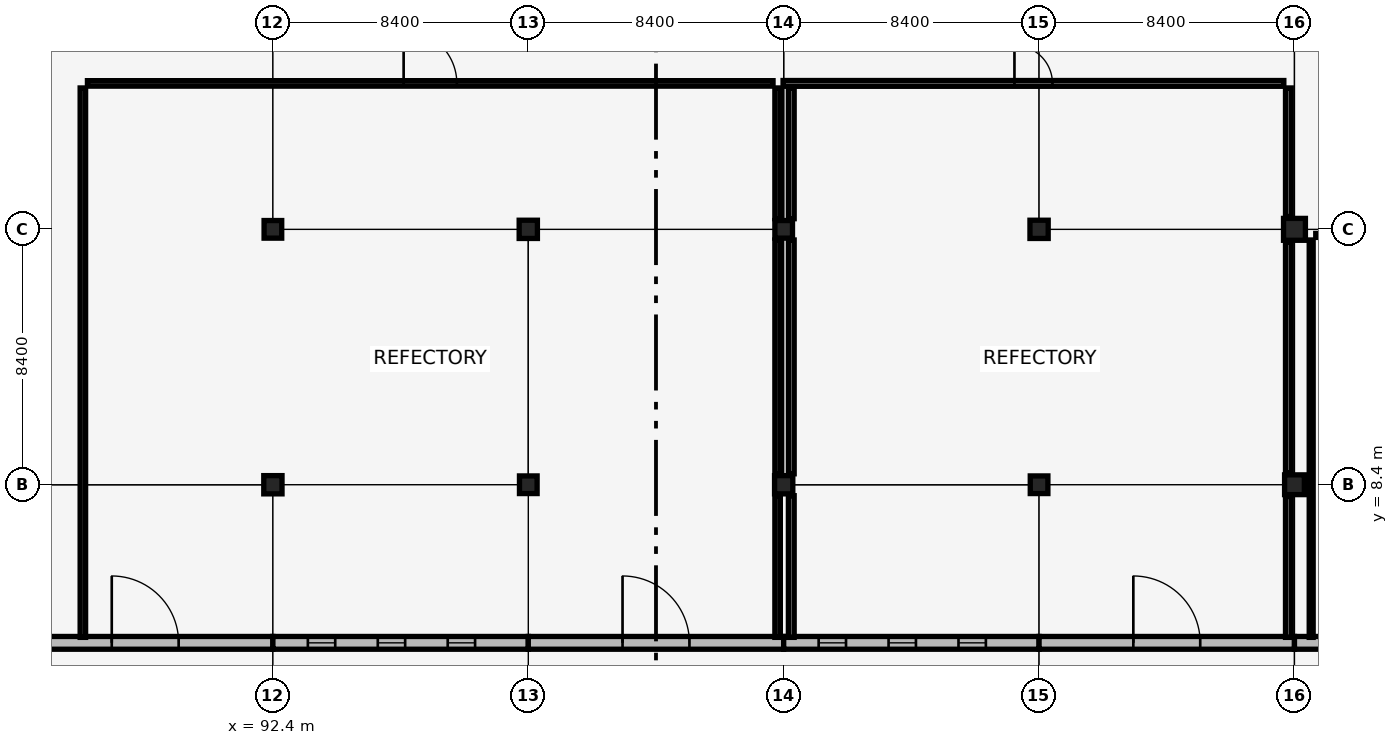
"""IFC4 building model, lengths in metres.
Left out: names, types, materials, properties, quantities, classifications, styles, units other than length and angle.
Written with IfcOpenShell. Run it as: python <this file> out.ifc"""

import sys

from ifc_helpers import new_model, si_unit, direction, frame, frame_2d, origin, origin_2d, place, context, subcontext, project, spatial, rectangle, extrude, element, fill, save


model = new_model("IFC4")
c1 = context("Model", 3, precision=1e-05, world=origin(), true_north=direction((0.0, 1.0)))
c2 = subcontext(c1, "Body", "Model", "MODEL_VIEW")
j1 = project(units=[si_unit("LENGTHUNIT", "METRE"), si_unit("PLANEANGLEUNIT", "RADIAN")], contexts=[c1])
p1 = place(None, origin())
s1 = spatial("IfcSite", under=j1, at=p1, CompositionType="ELEMENT")
p2 = place(p1, origin())
s2 = spatial("IfcBuilding", under=s1, at=p2, CompositionType="ELEMENT")
p3 = place(p2, origin())
s3 = spatial("IfcBuildingStorey", under=s2, at=p3, CompositionType="ELEMENT", Elevation=0.0)
p4 = place(p3, frame((92.4, 8.4, 0.0), z_axis=(0.0, 0.0, 1.0), x_axis=(1.0, 0.0, 0.0)))
e1 = element("IfcColumn", 1, at=p4, inside=s3, PredefinedType="COLUMN", context=c2, shape_type="SweptSolid", body=[
    extrude(rectangle(XDim=0.6, YDim=0.6, at=origin_2d()), origin(), (0.0, 0.0, 1.0), 5.14),
])
for number, where, z_axis, x_axis in (
    (2, (92.4, 16.8, 0.0), (0.0, 0.0, 1.0), (1.0, 0.0, 0.0)),
    (3, (100.8, 8.4, 0.0), (0.0, 0.0, 1.0), (1.0, 0.0, 0.0)),
):
    element("IfcColumn", number, at=place(p3, frame(where, z_axis=z_axis, x_axis=x_axis)), inside=s3, PredefinedType="COLUMN", context=c2, shape_type="SweptSolid", body=[
        extrude(rectangle(XDim=0.58, YDim=0.58, at=origin_2d()), origin(), (0.0, 0.0, 1.0), 5.14),
    ])
for number, where, z_axis, x_axis in (
    (4, (100.8, 16.8, 0.0), (0.0, 0.0, 1.0), (1.0, 0.0, 0.0)),
    (5, (109.2, 8.4, 0.0), (0.0, 0.0, 1.0), (1.0, 0.0, 0.0)),
):
    element("IfcColumn", number, at=place(p3, frame(where, z_axis=z_axis, x_axis=x_axis)), inside=s3, PredefinedType="COLUMN", context=c2, shape_type="SweptSolid", body=[
        extrude(rectangle(XDim=0.6, YDim=0.6, at=origin_2d()), origin(), (0.0, 0.0, 1.0), 5.14),
    ])
for number, where, z_axis, x_axis in (
    (6, (109.2, 16.8, 0.0), (0.0, 0.0, 1.0), (1.0, 0.0, 0.0)),
    (7, (117.6, 8.4, 0.0), (0.0, 0.0, 1.0), (1.0, 0.0, 0.0)),
):
    element("IfcColumn", number, at=place(p3, frame(where, z_axis=z_axis, x_axis=x_axis)), inside=s3, PredefinedType="COLUMN", context=c2, shape_type="SweptSolid", body=[
        extrude(rectangle(XDim=0.58, YDim=0.58, at=origin_2d()), origin(), (0.0, 0.0, 1.0), 5.14),
    ])
p5 = place(p3, frame((117.6, 16.8, 0.0), z_axis=(0.0, 0.0, 1.0), x_axis=(1.0, 0.0, 0.0)))
e8 = element("IfcColumn", 8, at=p5, inside=s3, PredefinedType="COLUMN", context=c2, shape_type="SweptSolid", body=[
    extrude(rectangle(XDim=0.6, YDim=0.6, at=origin_2d()), origin(), (0.0, 0.0, 1.0), 5.14),
])
p6 = place(p3, frame((126.0, 8.4, 0.0), z_axis=(0.0, 0.0, 1.0), x_axis=(1.0, 0.0, 0.0)))
e9 = element("IfcColumn", 9, at=p6, inside=s3, PredefinedType="COLUMN", context=c2, shape_type="SweptSolid", body=[
    extrude(rectangle(XDim=0.65, YDim=0.65, at=origin_2d()), origin(), (0.0, 0.0, 1.0), 5.14),
])
p7 = place(p3, frame((126.0, 16.8, 0.0), z_axis=(0.0, 0.0, 1.0), x_axis=(1.0, 0.0, 0.0)))
e10 = element("IfcColumn", 10, at=p7, inside=s3, PredefinedType="COLUMN", context=c2, shape_type="SweptSolid", body=[
    extrude(rectangle(XDim=0.72, YDim=0.72, at=origin_2d()), origin(), (0.0, 0.0, 1.0), 5.14),
])
p8 = place(p3, frame((84.0, 3.2, 0.0), z_axis=(0.0, 0.0, 1.0), x_axis=(1.0, 0.0, 0.0)))
e11 = element("IfcWall", 11, at=p8, inside=s3, PredefinedType="SOLIDWALL", context=c2, shape_type="SweptSolid", body=[
    extrude(rectangle(XDim=8.4, YDim=0.42, at=frame_2d((4.2, 0.0))), origin(), (0.0, 0.0, 1.0), 4.49),
])
p9 = place(p8, frame((3.1, 0.0, 0.0)))
e12 = element("IfcOpeningElement", 12, at=p9, cuts=e11, PredefinedType="OPENING", context=c2, shape_type="SweptSolid", body=[
    extrude(rectangle(XDim=2.2, YDim=2.4, at=frame_2d((1.1, 1.2))), frame((0.0, 0.22, 0.0), z_axis=(0.0, -1.0, 0.0), x_axis=(1.0, 0.0, 0.0)), (0.0, 0.0, 1.0), 0.44),
])
p10 = place(p3, frame((92.4, 3.2, 0.0), z_axis=(0.0, 0.0, 1.0), x_axis=(1.0, 0.0, 0.0)))
e13 = element("IfcWall", 13, at=p10, inside=s3, PredefinedType="SOLIDWALL", context=c2, shape_type="SweptSolid", body=[
    extrude(rectangle(XDim=8.4, YDim=0.42, at=frame_2d((4.2, 0.0))), origin(), (0.0, 0.0, 1.0), 4.49),
])
p11 = place(p10, frame((1.15, 0.0, 0.85)))
e14 = element("IfcOpeningElement", 14, at=p11, cuts=e13, PredefinedType="OPENING", context=c2, shape_type="SweptSolid", body=[
    extrude(rectangle(XDim=0.9, YDim=3.0, at=frame_2d((0.45, 1.5))), frame((0.0, 0.22, 0.0), z_axis=(0.0, -1.0, 0.0), x_axis=(1.0, 0.0, 0.0)), (0.0, 0.0, 1.0), 0.44),
])
p12 = place(p10, frame((3.45, 0.0, 0.85)))
e15 = element("IfcOpeningElement", 15, at=p12, cuts=e13, PredefinedType="OPENING", context=c2, shape_type="SweptSolid", body=[
    extrude(rectangle(XDim=0.9, YDim=3.0, at=frame_2d((0.45, 1.5))), frame((0.0, 0.22, 0.0), z_axis=(0.0, -1.0, 0.0), x_axis=(1.0, 0.0, 0.0)), (0.0, 0.0, 1.0), 0.44),
])
p13 = place(p10, frame((5.75, 0.0, 0.85)))
e16 = element("IfcOpeningElement", 16, at=p13, cuts=e13, PredefinedType="OPENING", context=c2, shape_type="SweptSolid", body=[
    extrude(rectangle(XDim=0.9, YDim=3.0, at=frame_2d((0.45, 1.5))), frame((0.0, 0.22, 0.0), z_axis=(0.0, -1.0, 0.0), x_axis=(1.0, 0.0, 0.0)), (0.0, 0.0, 1.0), 0.44),
])
p14 = place(p3, frame((100.8, 3.2, 0.0), z_axis=(0.0, 0.0, 1.0), x_axis=(1.0, 0.0, 0.0)))
e17 = element("IfcWall", 17, at=p14, inside=s3, PredefinedType="SOLIDWALL", context=c2, shape_type="SweptSolid", body=[
    extrude(rectangle(XDim=8.4, YDim=0.42, at=frame_2d((4.2, 0.0))), origin(), (0.0, 0.0, 1.0), 4.49),
])
p15 = place(p14, frame((3.1, 0.0, 0.0)))
e18 = element("IfcOpeningElement", 18, at=p15, cuts=e17, PredefinedType="OPENING", context=c2, shape_type="SweptSolid", body=[
    extrude(rectangle(XDim=2.2, YDim=2.4, at=frame_2d((1.1, 1.2))), frame((0.0, 0.22, 0.0), z_axis=(0.0, -1.0, 0.0), x_axis=(1.0, 0.0, 0.0)), (0.0, 0.0, 1.0), 0.44),
])
p16 = place(p3, frame((109.2, 3.2, 0.0), z_axis=(0.0, 0.0, 1.0), x_axis=(1.0, 0.0, 0.0)))
e19 = element("IfcWall", 19, at=p16, inside=s3, PredefinedType="SOLIDWALL", context=c2, shape_type="SweptSolid", body=[
    extrude(rectangle(XDim=8.4, YDim=0.42, at=frame_2d((4.2, 0.0))), origin(), (0.0, 0.0, 1.0), 4.49),
])
p17 = place(p16, frame((1.15, 0.0, 0.85)))
e20 = element("IfcOpeningElement", 20, at=p17, cuts=e19, PredefinedType="OPENING", context=c2, shape_type="SweptSolid", body=[
    extrude(rectangle(XDim=0.9, YDim=3.0, at=frame_2d((0.45, 1.5))), frame((0.0, 0.22, 0.0), z_axis=(0.0, -1.0, 0.0), x_axis=(1.0, 0.0, 0.0)), (0.0, 0.0, 1.0), 0.44),
])
p18 = place(p16, frame((3.45, 0.0, 0.85)))
e21 = element("IfcOpeningElement", 21, at=p18, cuts=e19, PredefinedType="OPENING", context=c2, shape_type="SweptSolid", body=[
    extrude(rectangle(XDim=0.9, YDim=3.0, at=frame_2d((0.45, 1.5))), frame((0.0, 0.22, 0.0), z_axis=(0.0, -1.0, 0.0), x_axis=(1.0, 0.0, 0.0)), (0.0, 0.0, 1.0), 0.44),
])
p19 = place(p16, frame((5.75, 0.0, 0.85)))
e22 = element("IfcOpeningElement", 22, at=p19, cuts=e19, PredefinedType="OPENING", context=c2, shape_type="SweptSolid", body=[
    extrude(rectangle(XDim=0.9, YDim=3.0, at=frame_2d((0.45, 1.5))), frame((0.0, 0.22, 0.0), z_axis=(0.0, -1.0, 0.0), x_axis=(1.0, 0.0, 0.0)), (0.0, 0.0, 1.0), 0.44),
])
p20 = place(p3, frame((117.6, 3.2, 0.0), z_axis=(0.0, 0.0, 1.0), x_axis=(1.0, 0.0, 0.0)))
e23 = element("IfcWall", 23, at=p20, inside=s3, PredefinedType="SOLIDWALL", context=c2, shape_type="SweptSolid", body=[
    extrude(rectangle(XDim=8.4, YDim=0.42, at=frame_2d((4.2, 0.0))), origin(), (0.0, 0.0, 1.0), 4.49),
])
p21 = place(p20, frame((3.1, 0.0, 0.0)))
e24 = element("IfcOpeningElement", 24, at=p21, cuts=e23, PredefinedType="OPENING", context=c2, shape_type="SweptSolid", body=[
    extrude(rectangle(XDim=2.2, YDim=2.4, at=frame_2d((1.1, 1.2))), frame((0.0, 0.22, 0.0), z_axis=(0.0, -1.0, 0.0), x_axis=(1.0, 0.0, 0.0)), (0.0, 0.0, 1.0), 0.44),
])
p22 = place(p3, frame((126.0, 3.2, 0.0), z_axis=(0.0, 0.0, 1.0), x_axis=(1.0, 0.0, 0.0)))
e25 = element("IfcWall", 25, at=p22, inside=s3, PredefinedType="SOLIDWALL", context=c2, shape_type="SweptSolid", body=[
    extrude(rectangle(XDim=8.4, YDim=0.42, at=frame_2d((4.2, 0.0))), origin(), (0.0, 0.0, 1.0), 4.49),
])
p23 = place(p22, frame((1.15, 0.0, 0.85)))
e26 = element("IfcOpeningElement", 26, at=p23, cuts=e25, PredefinedType="OPENING", context=c2, shape_type="SweptSolid", body=[
    extrude(rectangle(XDim=0.9, YDim=3.0, at=frame_2d((0.45, 1.5))), frame((0.0, 0.22, 0.0), z_axis=(0.0, -1.0, 0.0), x_axis=(1.0, 0.0, 0.0)), (0.0, 0.0, 1.0), 0.44),
])
p24 = place(p22, frame((3.45, 0.0, 0.85)))
e27 = element("IfcOpeningElement", 27, at=p24, cuts=e25, PredefinedType="OPENING", context=c2, shape_type="SweptSolid", body=[
    extrude(rectangle(XDim=0.9, YDim=3.0, at=frame_2d((0.45, 1.5))), frame((0.0, 0.22, 0.0), z_axis=(0.0, -1.0, 0.0), x_axis=(1.0, 0.0, 0.0)), (0.0, 0.0, 1.0), 0.44),
])
p25 = place(p22, frame((5.75, 0.0, 0.85)))
e28 = element("IfcOpeningElement", 28, at=p25, cuts=e25, PredefinedType="OPENING", context=c2, shape_type="SweptSolid", body=[
    extrude(rectangle(XDim=0.9, YDim=3.0, at=frame_2d((0.45, 1.5))), frame((0.0, 0.22, 0.0), z_axis=(0.0, -1.0, 0.0), x_axis=(1.0, 0.0, 0.0)), (0.0, 0.0, 1.0), 0.44),
])
p26 = place(p3, frame((86.3, 21.6, 0.0), z_axis=(0.0, 0.0, 1.0), x_axis=(1.0, 0.0, 0.0)))
e29 = element("IfcWall", 29, at=p26, inside=s3, PredefinedType="PARTITIONING", context=c2, shape_type="SweptSolid", body=[
    extrude(rectangle(XDim=22.55, YDim=0.18, at=frame_2d((11.275, 0.0))), origin(), (0.0, 0.0, 1.0), 4.49),
])
p27 = place(p26, frame((10.4, 0.0, 0.0)))
e30 = element("IfcOpeningElement", 30, at=p27, cuts=e29, PredefinedType="OPENING", context=c2, shape_type="SweptSolid", body=[
    extrude(rectangle(XDim=1.75, YDim=2.3, at=frame_2d((0.875, 1.15))), frame((0.0, 0.1, 0.0), z_axis=(0.0, -1.0, 0.0), x_axis=(1.0, 0.0, 0.0)), (0.0, 0.0, 1.0), 0.2),
])
p28 = place(p3, frame((86.15, 3.38, 0.0), z_axis=(0.0, 0.0, 1.0), x_axis=(0.0, 1.0, 0.0)))
e31 = element("IfcWall", 31, at=p28, inside=s3, PredefinedType="PARTITIONING", context=c2, shape_type="SweptSolid", body=[
    extrude(rectangle(XDim=18.07, YDim=0.18, at=frame_2d((9.035, 0.0))), origin(), (0.0, 0.0, 1.0), 4.36),
])
p29 = place(p3, frame((109.0, 3.38, 0.0), z_axis=(0.0, 0.0, 1.0), x_axis=(0.0, 1.0, 0.0)))
e32 = element("IfcWall", 32, at=p29, inside=s3, PredefinedType="PARTITIONING", context=c2, shape_type="SweptSolid", body=[
    extrude(rectangle(XDim=4.66, YDim=0.18, at=frame_2d((2.33, 0.0))), origin(), (0.0, 0.0, 1.0), 4.59),
])
p30 = place(p3, frame((109.0, 8.76, 0.0), z_axis=(0.0, 0.0, 1.0), x_axis=(0.0, 1.0, 0.0)))
e33 = element("IfcWall", 33, at=p30, inside=s3, PredefinedType="PARTITIONING", context=c2, shape_type="SweptSolid", body=[
    extrude(rectangle(XDim=7.69, YDim=0.18, at=frame_2d((3.845, 0.0))), origin(), (0.0, 0.0, 1.0), 4.58),
])
p31 = place(p3, frame((109.0, 17.15, 0.0), z_axis=(0.0, 0.0, 1.0), x_axis=(0.0, 1.0, 0.0)))
e34 = element("IfcWall", 34, at=p31, inside=s3, PredefinedType="PARTITIONING", context=c2, shape_type="SweptSolid", body=[
    extrude(rectangle(XDim=4.3, YDim=0.18, at=frame_2d((2.15, 0.0))), origin(), (0.0, 0.0, 1.0), 4.59),
])
p32 = place(p3, frame((109.18, 21.6, 0.0), z_axis=(0.0, 0.0, 1.0), x_axis=(1.0, 0.0, 0.0)))
e35 = element("IfcWall", 35, at=p32, inside=s3, PredefinedType="PARTITIONING", context=c2, shape_type="SweptSolid", body=[
    extrude(rectangle(XDim=16.47, YDim=0.19, at=frame_2d((8.235, 0.0))), origin(), (0.0, 0.0, 1.0), 4.49),
])
p33 = place(p32, frame((7.61, 0.0, 0.0)))
e36 = element("IfcOpeningElement", 36, at=p33, cuts=e35, PredefinedType="OPENING", context=c2, shape_type="SweptSolid", body=[
    extrude(rectangle(XDim=1.25, YDim=2.15, at=frame_2d((0.625, 1.075))), frame((0.0, 0.105, 0.0), z_axis=(0.0, -1.0, 0.0), x_axis=(1.0, 0.0, 0.0)), (0.0, 0.0, 1.0), 0.21),
])
p34 = place(p3, frame((109.45, 3.38, 0.0), z_axis=(0.0, 0.0, 1.0), x_axis=(0.0, 1.0, 0.0)))
e37 = element("IfcWall", 37, at=p34, inside=s3, PredefinedType="PARTITIONING", context=c2, shape_type="SweptSolid", body=[
    extrude(rectangle(XDim=4.66, YDim=0.19, at=frame_2d((2.33, 0.0))), origin(), (0.0, 0.0, 1.0), 4.58),
])
p35 = place(p3, frame((109.45, 8.76, 0.0), z_axis=(0.0, 0.0, 1.0), x_axis=(0.0, 1.0, 0.0)))
e38 = element("IfcWall", 38, at=p35, inside=s3, PredefinedType="PARTITIONING", context=c2, shape_type="SweptSolid", body=[
    extrude(rectangle(XDim=7.69, YDim=0.19, at=frame_2d((3.845, 0.0))), origin(), (0.0, 0.0, 1.0), 4.59),
])
p36 = place(p3, frame((109.45, 17.15, 0.0), z_axis=(0.0, 0.0, 1.0), x_axis=(0.0, 1.0, 0.0)))
e39 = element("IfcWall", 39, at=p36, inside=s3, PredefinedType="PARTITIONING", context=c2, shape_type="SweptSolid", body=[
    extrude(rectangle(XDim=4.3, YDim=0.19, at=frame_2d((2.15, 0.0))), origin(), (0.0, 0.0, 1.0), 4.58),
])
p37 = place(p3, frame((125.8, 3.38, 0.0), z_axis=(0.0, 0.0, 1.0), x_axis=(0.0, 1.0, 0.0)))
e40 = element("IfcWall", 40, at=p37, inside=s3, PredefinedType="PARTITIONING", context=c2, shape_type="SweptSolid", body=[
    extrude(rectangle(XDim=4.635, YDim=0.19, at=frame_2d((2.317, 0.0))), origin(), (0.0, 0.0, 1.0), 4.59),
])
p38 = place(p3, frame((125.8, 8.785, 0.0), z_axis=(0.0, 0.0, 1.0), x_axis=(0.0, 1.0, 0.0)))
e41 = element("IfcWall", 41, at=p38, inside=s3, PredefinedType="PARTITIONING", context=c2, shape_type="SweptSolid", body=[
    extrude(rectangle(XDim=7.595, YDim=0.19, at=frame_2d((3.797, 0.0))), origin(), (0.0, 0.0, 1.0), 4.58),
])
p39 = place(p3, frame((125.8, 17.22, 0.0), z_axis=(0.0, 0.0, 1.0), x_axis=(0.0, 1.0, 0.0)))
e42 = element("IfcWall", 42, at=p39, inside=s3, PredefinedType="PARTITIONING", context=c2, shape_type="SweptSolid", body=[
    extrude(rectangle(XDim=4.23, YDim=0.19, at=frame_2d((2.115, 0.0))), origin(), (0.0, 0.0, 1.0), 4.59),
])
p40 = place(p3, frame((126.7, 16.6, 0.0), z_axis=(0.0, 0.0, 1.0), x_axis=(1.0, 0.0, 0.0)))
e43 = element("IfcWall", 43, at=p40, inside=s3, PredefinedType="PARTITIONING", context=c2, shape_type="SweptSolid", body=[
    extrude(rectangle(XDim=7.0, YDim=0.13, at=frame_2d((3.5, 0.0))), origin(), (0.0, 0.0, 1.0), 4.36),
])
p41 = place(p40, frame((3.05, 0.0, 0.0)))
e44 = element("IfcOpeningElement", 44, at=p41, cuts=e43, PredefinedType="OPENING", context=c2, shape_type="SweptSolid", body=[
    extrude(rectangle(XDim=0.9, YDim=2.1, at=frame_2d((0.45, 1.05))), frame((0.0, 0.075, 0.0), z_axis=(0.0, -1.0, 0.0), x_axis=(1.0, 0.0, 0.0)), (0.0, 0.0, 1.0), 0.15),
])
p42 = place(p3, frame((126.55, 3.38, 0.0), z_axis=(0.0, 0.0, 1.0), x_axis=(0.0, 1.0, 0.0)))
e45 = element("IfcWall", 45, at=p42, inside=s3, PredefinedType="PARTITIONING", context=c2, shape_type="SweptSolid", body=[
    extrude(rectangle(XDim=13.07, YDim=0.13, at=frame_2d((6.535, 0.0))), origin(), (0.0, 0.0, 1.0), 4.46),
])
p43 = place(p9, origin())
e46 = element("IfcDoor", 46, at=p43, inside=s3, OperationType="DOUBLE_DOOR_SINGLE_SWING", PredefinedType="DOOR", context=c2, shape_type="SweptSolid", body=[
    extrude(rectangle(XDim=2.2, YDim=2.4, at=frame_2d((1.1, 1.2))), frame((0.0, 0.025, 0.0), z_axis=(0.0, -1.0, 0.0), x_axis=(1.0, 0.0, 0.0)), (0.0, 0.0, 1.0), 0.05),
])
fill(e12, e46)
p44 = place(p11, origin())
e47 = element("IfcWindow", 47, at=p44, inside=s3, PartitioningType="DOUBLE_PANEL_VERTICAL", PredefinedType="WINDOW", context=c2, shape_type="SweptSolid", body=[
    extrude(rectangle(XDim=0.9, YDim=3.0, at=frame_2d((0.45, 1.5))), frame((0.0, 0.03, 0.0), z_axis=(0.0, -1.0, 0.0), x_axis=(1.0, 0.0, 0.0)), (0.0, 0.0, 1.0), 0.06),
])
fill(e14, e47)
p45 = place(p12, origin())
e48 = element("IfcWindow", 48, at=p45, inside=s3, PartitioningType="DOUBLE_PANEL_VERTICAL", PredefinedType="WINDOW", context=c2, shape_type="SweptSolid", body=[
    extrude(rectangle(XDim=0.9, YDim=3.0, at=frame_2d((0.45, 1.5))), frame((0.0, 0.03, 0.0), z_axis=(0.0, -1.0, 0.0), x_axis=(1.0, 0.0, 0.0)), (0.0, 0.0, 1.0), 0.06),
])
fill(e15, e48)
p46 = place(p13, origin())
e49 = element("IfcWindow", 49, at=p46, inside=s3, PartitioningType="DOUBLE_PANEL_VERTICAL", PredefinedType="WINDOW", context=c2, shape_type="SweptSolid", body=[
    extrude(rectangle(XDim=0.9, YDim=3.0, at=frame_2d((0.45, 1.5))), frame((0.0, 0.03, 0.0), z_axis=(0.0, -1.0, 0.0), x_axis=(1.0, 0.0, 0.0)), (0.0, 0.0, 1.0), 0.06),
])
fill(e16, e49)
p47 = place(p15, origin())
e50 = element("IfcDoor", 50, at=p47, inside=s3, OperationType="DOUBLE_DOOR_SINGLE_SWING", PredefinedType="DOOR", context=c2, shape_type="SweptSolid", body=[
    extrude(rectangle(XDim=2.2, YDim=2.4, at=frame_2d((1.1, 1.2))), frame((0.0, 0.025, 0.0), z_axis=(0.0, -1.0, 0.0), x_axis=(1.0, 0.0, 0.0)), (0.0, 0.0, 1.0), 0.05),
])
fill(e18, e50)
p48 = place(p17, origin())
e51 = element("IfcWindow", 51, at=p48, inside=s3, PartitioningType="DOUBLE_PANEL_VERTICAL", PredefinedType="WINDOW", context=c2, shape_type="SweptSolid", body=[
    extrude(rectangle(XDim=0.9, YDim=3.0, at=frame_2d((0.45, 1.5))), frame((0.0, 0.03, 0.0), z_axis=(0.0, -1.0, 0.0), x_axis=(1.0, 0.0, 0.0)), (0.0, 0.0, 1.0), 0.06),
])
fill(e20, e51)
p49 = place(p18, origin())
e52 = element("IfcWindow", 52, at=p49, inside=s3, PartitioningType="DOUBLE_PANEL_VERTICAL", PredefinedType="WINDOW", context=c2, shape_type="SweptSolid", body=[
    extrude(rectangle(XDim=0.9, YDim=3.0, at=frame_2d((0.45, 1.5))), frame((0.0, 0.03, 0.0), z_axis=(0.0, -1.0, 0.0), x_axis=(1.0, 0.0, 0.0)), (0.0, 0.0, 1.0), 0.06),
])
fill(e21, e52)
p50 = place(p19, origin())
e53 = element("IfcWindow", 53, at=p50, inside=s3, PartitioningType="DOUBLE_PANEL_VERTICAL", PredefinedType="WINDOW", context=c2, shape_type="SweptSolid", body=[
    extrude(rectangle(XDim=0.9, YDim=3.0, at=frame_2d((0.45, 1.5))), frame((0.0, 0.03, 0.0), z_axis=(0.0, -1.0, 0.0), x_axis=(1.0, 0.0, 0.0)), (0.0, 0.0, 1.0), 0.06),
])
fill(e22, e53)
p51 = place(p21, origin())
e54 = element("IfcDoor", 54, at=p51, inside=s3, OperationType="DOUBLE_DOOR_SINGLE_SWING", PredefinedType="DOOR", context=c2, shape_type="SweptSolid", body=[
    extrude(rectangle(XDim=2.2, YDim=2.4, at=frame_2d((1.1, 1.2))), frame((0.0, 0.025, 0.0), z_axis=(0.0, -1.0, 0.0), x_axis=(1.0, 0.0, 0.0)), (0.0, 0.0, 1.0), 0.05),
])
fill(e24, e54)
p52 = place(p27, origin())
e55 = element("IfcDoor", 55, at=p52, inside=s3, OperationType="DOUBLE_DOOR_SINGLE_SWING", PredefinedType="DOOR", context=c2, shape_type="SweptSolid", body=[
    extrude(rectangle(XDim=1.75, YDim=2.3, at=frame_2d((0.875, 1.15))), frame((0.0, 0.025, 0.0), z_axis=(0.0, -1.0, 0.0), x_axis=(1.0, 0.0, 0.0)), (0.0, 0.0, 1.0), 0.05),
])
fill(e30, e55)
p53 = place(p33, origin())
e56 = element("IfcDoor", 56, at=p53, inside=s3, OperationType="SINGLE_SWING_LEFT", PredefinedType="DOOR", context=c2, shape_type="SweptSolid", body=[
    extrude(rectangle(XDim=1.25, YDim=2.15, at=frame_2d((0.625, 1.075))), frame((0.0, 0.025, 0.0), z_axis=(0.0, -1.0, 0.0), x_axis=(1.0, 0.0, 0.0)), (0.0, 0.0, 1.0), 0.05),
])
fill(e36, e56)
save(model, sys.argv[1])
